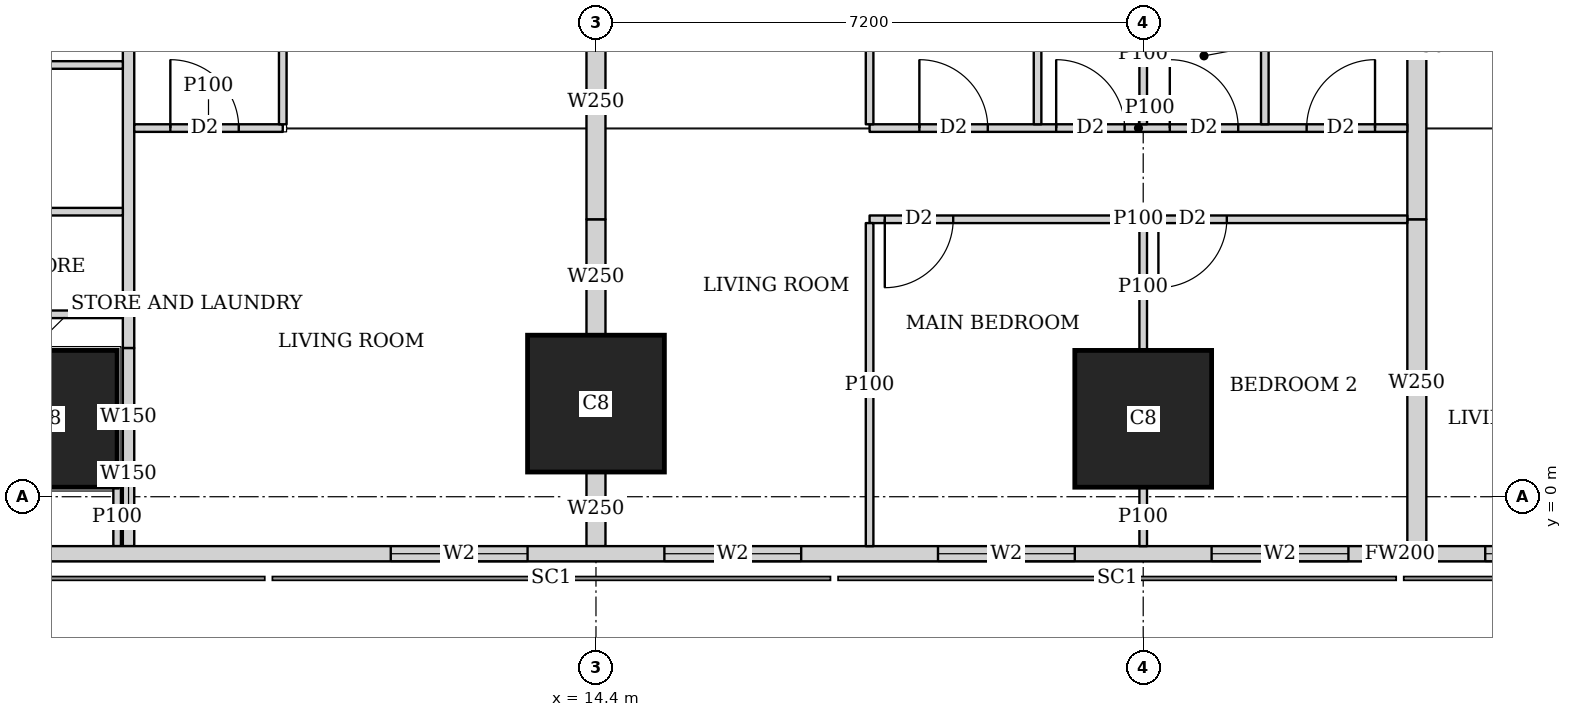
"""IFC4 building model, lengths in metres.
Left out: names, types, materials, properties, quantities, classifications, styles, units other than length and angle.
Written with IfcOpenShell. Run it as: python <this file> out.ifc"""

import sys

from ifc_helpers import new_model, si_unit, direction, frame, frame_2d, origin, origin_2d, place, context, subcontext, project, spatial, rectangle, extrude, element, fill, save


model = new_model("IFC4")
c1 = context("Model", 3, precision=1e-05, world=origin(), true_north=direction((0.0, 1.0)))
c2 = subcontext(c1, "Body", "Model", "MODEL_VIEW")
j1 = project(units=[si_unit("LENGTHUNIT", "METRE"), si_unit("PLANEANGLEUNIT", "RADIAN")], contexts=[c1])
p1 = place(None, origin())
s1 = spatial("IfcSite", under=j1, at=p1, CompositionType="ELEMENT")
p2 = place(p1, origin())
s2 = spatial("IfcBuilding", under=s1, at=p2, CompositionType="ELEMENT")
p3 = place(p2, frame((0.0, 0.0, 147.05)))
s3 = spatial("IfcBuildingStorey", under=s2, at=p3, CompositionType="ELEMENT", Elevation=147.05)
for number, where, z_axis, x_axis in (
    (1, (7.2, 1.025, 0.0), (0.0, 0.0, 1.0), (1.0, 0.0, 0.0)),
    (2, (14.4, 1.225, 0.0), (0.0, 0.0, 1.0), (1.0, 0.0, 0.0)),
    (3, (21.6, 1.025, 0.0), (0.0, 0.0, 1.0), (1.0, 0.0, 0.0)),
):
    element("IfcColumn", number, at=place(p3, frame(where, z_axis=z_axis, x_axis=x_axis)), inside=s3, PredefinedType="COLUMN", context=c2, shape_type="SweptSolid", body=[
        extrude(rectangle(XDim=1.8, YDim=1.8, at=origin_2d()), origin(), (0.0, 0.0, 1.0), 3.75),
    ])
p4 = place(p3, frame((2.163, -0.75, 0.0), z_axis=(0.0, 0.0, 1.0), x_axis=(1.0, 0.0, 0.0)))
e4 = element("IfcWall", 4, at=p4, inside=s3, PredefinedType="SOLIDWALL", context=c2, shape_type="SweptSolid", body=[
    extrude(rectangle(XDim=45.628, YDim=0.2, at=frame_2d((22.814, 0.0))), origin(), (0.0, 0.0, 1.0), 3.5),
])
p5 = place(p4, frame((9.537, 0.0, 0.9)))
e5 = element("IfcOpeningElement", 5, at=p5, cuts=e4, PredefinedType="OPENING", context=c2, shape_type="SweptSolid", body=[
    extrude(rectangle(XDim=1.8, YDim=1.5, at=frame_2d((0.9, 0.75))), frame((0.0, 0.11, 0.0), z_axis=(0.0, -1.0, 0.0), x_axis=(1.0, 0.0, 0.0)), (0.0, 0.0, 1.0), 0.22),
])
p6 = place(p4, frame((13.137, 0.0, 0.9)))
e6 = element("IfcOpeningElement", 6, at=p6, cuts=e4, PredefinedType="OPENING", context=c2, shape_type="SweptSolid", body=[
    extrude(rectangle(XDim=1.8, YDim=1.5, at=frame_2d((0.9, 0.75))), frame((0.0, 0.11, 0.0), z_axis=(0.0, -1.0, 0.0), x_axis=(1.0, 0.0, 0.0)), (0.0, 0.0, 1.0), 0.22),
])
p7 = place(p4, frame((16.737, 0.0, 0.9)))
e7 = element("IfcOpeningElement", 7, at=p7, cuts=e4, PredefinedType="OPENING", context=c2, shape_type="SweptSolid", body=[
    extrude(rectangle(XDim=1.8, YDim=1.5, at=frame_2d((0.9, 0.75))), frame((0.0, 0.11, 0.0), z_axis=(0.0, -1.0, 0.0), x_axis=(1.0, 0.0, 0.0)), (0.0, 0.0, 1.0), 0.22),
])
p8 = place(p4, frame((20.337, 0.0, 0.9)))
e8 = element("IfcOpeningElement", 8, at=p8, cuts=e4, PredefinedType="OPENING", context=c2, shape_type="SweptSolid", body=[
    extrude(rectangle(XDim=1.8, YDim=1.5, at=frame_2d((0.9, 0.75))), frame((0.0, 0.11, 0.0), z_axis=(0.0, -1.0, 0.0), x_axis=(1.0, 0.0, 0.0)), (0.0, 0.0, 1.0), 0.22),
])
p9 = place(p4, frame((23.937, 0.0, 0.9)))
e9 = element("IfcOpeningElement", 9, at=p9, cuts=e4, PredefinedType="OPENING", context=c2, shape_type="SweptSolid", body=[
    extrude(rectangle(XDim=1.8, YDim=1.5, at=frame_2d((0.9, 0.75))), frame((0.0, 0.11, 0.0), z_axis=(0.0, -1.0, 0.0), x_axis=(1.0, 0.0, 0.0)), (0.0, 0.0, 1.0), 0.22),
])
p10 = place(p4, frame((27.537, 0.0, 0.9)))
e10 = element("IfcOpeningElement", 10, at=p10, cuts=e4, PredefinedType="OPENING", context=c2, shape_type="SweptSolid", body=[
    extrude(rectangle(XDim=1.8, YDim=1.5, at=frame_2d((0.9, 0.75))), frame((0.0, 0.11, 0.0), z_axis=(0.0, -1.0, 0.0), x_axis=(1.0, 0.0, 0.0)), (0.0, 0.0, 1.0), 0.22),
])
p11 = place(p4, frame((31.137, 0.0, 0.9)))
e11 = element("IfcOpeningElement", 11, at=p11, cuts=e4, PredefinedType="OPENING", context=c2, shape_type="SweptSolid", body=[
    extrude(rectangle(XDim=1.8, YDim=1.5, at=frame_2d((0.9, 0.75))), frame((0.0, 0.11, 0.0), z_axis=(0.0, -1.0, 0.0), x_axis=(1.0, 0.0, 0.0)), (0.0, 0.0, 1.0), 0.22),
])
p12 = place(p4, frame((34.737, 0.0, 0.9)))
e12 = element("IfcOpeningElement", 12, at=p12, cuts=e4, PredefinedType="OPENING", context=c2, shape_type="SweptSolid", body=[
    extrude(rectangle(XDim=1.8, YDim=1.5, at=frame_2d((0.9, 0.75))), frame((0.0, 0.11, 0.0), z_axis=(0.0, -1.0, 0.0), x_axis=(1.0, 0.0, 0.0)), (0.0, 0.0, 1.0), 0.22),
])
p13 = place(p3, frame((8.25, -0.65, 0.0), z_axis=(0.0, 0.0, 1.0), x_axis=(0.0, 1.0, 0.0)))
e13 = element("IfcWall", 13, at=p13, inside=s3, PredefinedType="SOLIDWALL", context=c2, shape_type="SweptSolid", body=[
    extrude(rectangle(XDim=0.802, YDim=0.15, at=frame_2d((0.401, 0.0))), origin(), (0.0, 0.0, 1.0), 3.5),
])
p14 = place(p3, frame((8.25, 0.152, 0.0), z_axis=(0.0, 0.0, 1.0), x_axis=(0.0, 1.0, 0.0)))
e14 = element("IfcWall", 14, at=p14, inside=s3, PredefinedType="SOLIDWALL", context=c2, shape_type="SweptSolid", body=[
    extrude(rectangle(XDim=1.805, YDim=0.15, at=frame_2d((0.902, 0.0))), origin(), (0.0, 0.0, 1.0), 2.1),
])
p15 = place(p3, frame((8.25, 1.957, 0.0), z_axis=(0.0, 0.0, 1.0), x_axis=(0.0, 1.0, 0.0)))
e15 = element("IfcWall", 15, at=p15, inside=s3, PredefinedType="SOLIDWALL", context=c2, shape_type="SweptSolid", body=[
    extrude(rectangle(XDim=41.111, YDim=0.15, at=frame_2d((20.556, 0.0))), origin(), (0.0, 0.0, 1.0), 3.5),
])
p16 = place(p15, frame((14.418, 0.0, 0.0)))
e16 = element("IfcOpeningElement", 16, at=p16, cuts=e15, PredefinedType="OPENING", context=c2, shape_type="SweptSolid", body=[
    extrude(rectangle(XDim=1.0, YDim=2.1, at=frame_2d((0.5, 1.05))), frame((0.0, 0.085, 0.0), z_axis=(0.0, -1.0, 0.0), x_axis=(1.0, 0.0, 0.0)), (0.0, 0.0, 1.0), 0.17),
])
p17 = place(p15, frame((18.168, 0.0, 0.0)))
e17 = element("IfcOpeningElement", 17, at=p17, cuts=e15, PredefinedType="OPENING", context=c2, shape_type="SweptSolid", body=[
    extrude(rectangle(XDim=1.0, YDim=2.1, at=frame_2d((0.5, 1.05))), frame((0.0, 0.085, 0.0), z_axis=(0.0, -1.0, 0.0), x_axis=(1.0, 0.0, 0.0)), (0.0, 0.0, 1.0), 0.17),
])
p18 = place(p15, frame((33.168, 0.0, 0.0)))
e18 = element("IfcOpeningElement", 18, at=p18, cuts=e15, PredefinedType="OPENING", context=c2, shape_type="SweptSolid", body=[
    extrude(rectangle(XDim=1.0, YDim=2.1, at=frame_2d((0.5, 1.05))), frame((0.0, 0.085, 0.0), z_axis=(0.0, -1.0, 0.0), x_axis=(1.0, 0.0, 0.0)), (0.0, 0.0, 1.0), 0.17),
])
p19 = place(p3, frame((8.1, 0.124, 0.0), z_axis=(0.0, 0.0, 1.0), x_axis=(0.0, -1.0, 0.0)))
e19 = element("IfcWall", 19, at=p19, inside=s3, PredefinedType="PARTITIONING", context=c2, shape_type="SweptSolid", body=[
    extrude(rectangle(XDim=0.774, YDim=0.1, at=frame_2d((0.387, 0.0))), origin(), (0.0, 0.0, 1.0), 3.5),
])
for number, where, z_axis, x_axis in (
    (20, (4.9, 3.75, 0.0), (0.0, 0.0, 1.0), (1.0, 0.0, 0.0)),
    (21, (4.9, 5.68, 0.0), (0.0, 0.0, 1.0), (1.0, 0.0, 0.0)),
):
    element("IfcWall", number, at=place(p3, frame(where, z_axis=z_axis, x_axis=x_axis)), inside=s3, PredefinedType="PARTITIONING", context=c2, shape_type="SweptSolid", body=[
        extrude(rectangle(XDim=3.275, YDim=0.1, at=frame_2d((1.638, 0.0))), origin(), (0.0, 0.0, 1.0), 3.5),
    ])
p20 = place(p3, frame((10.279, 4.85, 0.0), z_axis=(0.0, 0.0, 1.0), x_axis=(-1.0, 0.0, 0.0)))
e22 = element("IfcWall", 22, at=p20, inside=s3, PredefinedType="PARTITIONING", context=c2, shape_type="SweptSolid", body=[
    extrude(rectangle(XDim=1.954, YDim=0.1, at=frame_2d((0.977, 0.0))), origin(), (0.0, 0.0, 1.0), 3.5),
])
p21 = place(p20, frame((0.579, 0.0, 0.0)))
e23 = element("IfcOpeningElement", 23, at=p21, cuts=e22, PredefinedType="OPENING", context=c2, shape_type="SweptSolid", body=[
    extrude(rectangle(XDim=0.9, YDim=2.1, at=frame_2d((0.45, 1.05))), frame((0.0, 0.06, 0.0), z_axis=(0.0, -1.0, 0.0), x_axis=(1.0, 0.0, 0.0)), (0.0, 0.0, 1.0), 0.12),
])
p22 = place(p3, frame((10.279, 4.9, 0.0), z_axis=(0.0, 0.0, 1.0), x_axis=(0.0, 1.0, 0.0)))
e24 = element("IfcWall", 24, at=p22, inside=s3, PredefinedType="PARTITIONING", context=c2, shape_type="SweptSolid", body=[
    extrude(rectangle(XDim=3.275, YDim=0.1, at=frame_2d((1.638, 0.0))), origin(), (0.0, 0.0, 1.0), 3.5),
])
p23 = place(p3, frame((25.075, 3.65, 0.0), z_axis=(0.0, 0.0, 1.0), x_axis=(-1.0, 0.0, 0.0)))
e25 = element("IfcWall", 25, at=p23, inside=s3, PredefinedType="PARTITIONING", context=c2, shape_type="SweptSolid", body=[
    extrude(rectangle(XDim=7.075, YDim=0.1, at=frame_2d((3.538, 0.0))), origin(), (0.0, 0.0, 1.0), 3.5),
])
p24 = place(p23, frame((5.975, 0.0, 0.0)))
e26 = element("IfcOpeningElement", 26, at=p24, cuts=e25, PredefinedType="OPENING", context=c2, shape_type="SweptSolid", body=[
    extrude(rectangle(XDim=0.9, YDim=2.1, at=frame_2d((0.45, 1.05))), frame((0.0, 0.06, 0.0), z_axis=(0.0, -1.0, 0.0), x_axis=(1.0, 0.0, 0.0)), (0.0, 0.0, 1.0), 0.12),
])
p25 = place(p23, frame((2.375, 0.0, 0.0)))
e27 = element("IfcOpeningElement", 27, at=p25, cuts=e25, PredefinedType="OPENING", context=c2, shape_type="SweptSolid", body=[
    extrude(rectangle(XDim=0.9, YDim=2.1, at=frame_2d((0.45, 1.05))), frame((0.0, 0.06, 0.0), z_axis=(0.0, -1.0, 0.0), x_axis=(1.0, 0.0, 0.0)), (0.0, 0.0, 1.0), 0.12),
])
p26 = place(p3, frame((25.075, 4.85, 0.0), z_axis=(0.0, 0.0, 1.0), x_axis=(-1.0, 0.0, 0.0)))
e28 = element("IfcWall", 28, at=p26, inside=s3, PredefinedType="PARTITIONING", context=c2, shape_type="SweptSolid", body=[
    extrude(rectangle(XDim=7.075, YDim=0.1, at=frame_2d((3.538, 0.0))), origin(), (0.0, 0.0, 1.0), 3.5),
])
p27 = place(p26, frame((5.52, 0.0, 0.0)))
e29 = element("IfcOpeningElement", 29, at=p27, cuts=e28, PredefinedType="OPENING", context=c2, shape_type="SweptSolid", body=[
    extrude(rectangle(XDim=0.9, YDim=2.1, at=frame_2d((0.45, 1.05))), frame((0.0, 0.06, 0.0), z_axis=(0.0, -1.0, 0.0), x_axis=(1.0, 0.0, 0.0)), (0.0, 0.0, 1.0), 0.12),
])
p28 = place(p26, frame((2.225, 0.0, 0.0)))
e30 = element("IfcOpeningElement", 30, at=p28, cuts=e28, PredefinedType="OPENING", context=c2, shape_type="SweptSolid", body=[
    extrude(rectangle(XDim=0.9, YDim=2.1, at=frame_2d((0.45, 1.05))), frame((0.0, 0.06, 0.0), z_axis=(0.0, -1.0, 0.0), x_axis=(1.0, 0.0, 0.0)), (0.0, 0.0, 1.0), 0.12),
])
p29 = place(p26, frame((3.72, 0.0, 0.0)))
e31 = element("IfcOpeningElement", 31, at=p29, cuts=e28, PredefinedType="OPENING", context=c2, shape_type="SweptSolid", body=[
    extrude(rectangle(XDim=0.9, YDim=2.1, at=frame_2d((0.45, 1.05))), frame((0.0, 0.06, 0.0), z_axis=(0.0, -1.0, 0.0), x_axis=(1.0, 0.0, 0.0)), (0.0, 0.0, 1.0), 0.12),
])
p30 = place(p26, frame((0.425, 0.0, 0.0)))
e32 = element("IfcOpeningElement", 32, at=p30, cuts=e28, PredefinedType="OPENING", context=c2, shape_type="SweptSolid", body=[
    extrude(rectangle(XDim=0.9, YDim=2.1, at=frame_2d((0.45, 1.05))), frame((0.0, 0.06, 0.0), z_axis=(0.0, -1.0, 0.0), x_axis=(1.0, 0.0, 0.0)), (0.0, 0.0, 1.0), 0.12),
])
p31 = place(p3, frame((18.0, -0.65, 0.0), z_axis=(0.0, 0.0, 1.0), x_axis=(0.0, 1.0, 0.0)))
e33 = element("IfcWall", 33, at=p31, inside=s3, PredefinedType="PARTITIONING", context=c2, shape_type="SweptSolid", body=[
    extrude(rectangle(XDim=4.25, YDim=0.1, at=frame_2d((2.125, 0.0))), origin(), (0.0, 0.0, 1.0), 2.1),
])
p32 = place(p3, frame((21.6, -0.65, 0.0), z_axis=(0.0, 0.0, 1.0), x_axis=(0.0, 1.0, 0.0)))
e34 = element("IfcWall", 34, at=p32, inside=s3, PredefinedType="PARTITIONING", context=c2, shape_type="SweptSolid", body=[
    extrude(rectangle(XDim=0.774, YDim=0.1, at=frame_2d((0.387, 0.0))), origin(), (0.0, 0.0, 1.0), 3.5),
])
p33 = place(p3, frame((21.6, 1.926, 0.0), z_axis=(0.0, 0.0, 1.0), x_axis=(0.0, 1.0, 0.0)))
e35 = element("IfcWall", 35, at=p33, inside=s3, PredefinedType="PARTITIONING", context=c2, shape_type="SweptSolid", body=[
    extrude(rectangle(XDim=1.674, YDim=0.1, at=frame_2d((0.837, 0.0))), origin(), (0.0, 0.0, 1.0), 3.5),
])
p34 = place(p3, frame((18.0, 4.9, 0.0), z_axis=(0.0, 0.0, 1.0), x_axis=(0.0, 1.0, 0.0)))
e36 = element("IfcWall", 36, at=p34, inside=s3, PredefinedType="PARTITIONING", context=c2, shape_type="SweptSolid", body=[
    extrude(rectangle(XDim=3.275, YDim=0.1, at=frame_2d((1.638, 0.0))), origin(), (0.0, 0.0, 1.0), 3.5),
])
p35 = place(p3, frame((21.6, 4.9, 0.0), z_axis=(0.0, 0.0, 1.0), x_axis=(0.0, 1.0, 0.0)))
e37 = element("IfcWall", 37, at=p35, inside=s3, PredefinedType="PARTITIONING", context=c2, shape_type="SweptSolid", body=[
    extrude(rectangle(XDim=1.849, YDim=0.1, at=frame_2d((0.925, 0.0))), origin(), (0.0, 0.0, 1.0), 3.5),
])
for number, where, z_axis, x_axis in (
    (38, (20.21, 4.9, 0.0), (0.0, 0.0, 1.0), (0.0, 1.0, 0.0)),
    (39, (23.2, 4.9, 0.0), (0.0, 0.0, 1.0), (0.0, 1.0, 0.0)),
):
    element("IfcWall", number, at=place(p3, frame(where, z_axis=z_axis, x_axis=x_axis)), inside=s3, PredefinedType="PARTITIONING", context=c2, shape_type="SweptSolid", body=[
        extrude(rectangle(XDim=3.275, YDim=0.1, at=frame_2d((1.638, 0.0))), origin(), (0.0, 0.0, 1.0), 3.5),
    ])
p36 = place(p3, frame((14.4, -0.65, 0.0), z_axis=(0.0, 0.0, 1.0), x_axis=(0.0, 1.0, 0.0)))
e40 = element("IfcWall", 40, at=p36, inside=s3, PredefinedType="SOLIDWALL", context=c2, shape_type="SweptSolid", body=[
    extrude(rectangle(XDim=0.974, YDim=0.25, at=frame_2d((0.487, 0.0))), origin(), (0.0, 0.0, 1.0), 2.1),
])
p37 = place(p3, frame((14.4, 2.126, 0.0), z_axis=(0.0, 0.0, 1.0), x_axis=(0.0, 1.0, 0.0)))
e41 = element("IfcWall", 41, at=p37, inside=s3, PredefinedType="SOLIDWALL", context=c2, shape_type="SweptSolid", body=[
    extrude(rectangle(XDim=1.524, YDim=0.25, at=frame_2d((0.762, 0.0))), origin(), (0.0, 0.0, 1.0), 2.1),
])
p38 = place(p3, frame((14.4, 3.65, 0.0), z_axis=(0.0, 0.0, 1.0), x_axis=(0.0, 1.0, 0.0)))
e42 = element("IfcWall", 42, at=p38, inside=s3, PredefinedType="SOLIDWALL", context=c2, shape_type="SweptSolid", body=[
    extrude(rectangle(XDim=3.099, YDim=0.25, at=frame_2d((1.55, 0.0))), origin(), (0.0, 0.0, 1.0), 3.5),
])
p39 = place(p3, frame((25.2, -0.65, 0.0), z_axis=(0.0, 0.0, 1.0), x_axis=(0.0, 1.0, 0.0)))
e43 = element("IfcWall", 43, at=p39, inside=s3, PredefinedType="SOLIDWALL", context=c2, shape_type="SweptSolid", body=[
    extrude(rectangle(XDim=4.3, YDim=0.25, at=frame_2d((2.15, 0.0))), origin(), (0.0, 0.0, 1.0), 2.1),
])
p40 = place(p3, frame((25.2, 3.65, 0.0), z_axis=(0.0, 0.0, 1.0), x_axis=(0.0, 1.0, 0.0)))
e44 = element("IfcWall", 44, at=p40, inside=s3, PredefinedType="SOLIDWALL", context=c2, shape_type="SweptSolid", body=[
    extrude(rectangle(XDim=4.525, YDim=0.25, at=frame_2d((2.263, 0.0))), origin(), (0.0, 0.0, 1.0), 3.5),
])
p41 = place(p3, frame((5.467, 2.4, 0.0), z_axis=(0.0, 0.0, 1.0), x_axis=(1.0, 0.0, 0.0)))
e45 = element("IfcWall", 45, at=p41, inside=s3, PredefinedType="PARTITIONING", context=c2, shape_type="SweptSolid", body=[
    extrude(rectangle(XDim=2.708, YDim=0.1, at=frame_2d((1.354, 0.0))), origin(), (0.0, 0.0, 1.0), 3.5),
])
p42 = place(p41, frame((0.108, 0.0, 0.0)))
e46 = element("IfcOpeningElement", 46, at=p42, cuts=e45, PredefinedType="OPENING", context=c2, shape_type="SweptSolid", body=[
    extrude(rectangle(XDim=0.9, YDim=2.1, at=frame_2d((0.45, 1.05))), frame((0.0, 0.06, 0.0), z_axis=(0.0, -1.0, 0.0), x_axis=(1.0, 0.0, 0.0)), (0.0, 0.0, 1.0), 0.12),
])
p43 = place(p5, origin())
e47 = element("IfcWindow", 47, at=p43, inside=s3, PartitioningType="SINGLE_PANEL", PredefinedType="WINDOW", context=c2, shape_type="SweptSolid", body=[
    extrude(rectangle(XDim=1.8, YDim=1.5, at=frame_2d((0.9, 0.75))), frame((0.0, 0.03, 0.0), z_axis=(0.0, -1.0, 0.0), x_axis=(1.0, 0.0, 0.0)), (0.0, 0.0, 1.0), 0.06),
])
fill(e5, e47)
p44 = place(p6, origin())
e48 = element("IfcWindow", 48, at=p44, inside=s3, PartitioningType="SINGLE_PANEL", PredefinedType="WINDOW", context=c2, shape_type="SweptSolid", body=[
    extrude(rectangle(XDim=1.8, YDim=1.5, at=frame_2d((0.9, 0.75))), frame((0.0, 0.03, 0.0), z_axis=(0.0, -1.0, 0.0), x_axis=(1.0, 0.0, 0.0)), (0.0, 0.0, 1.0), 0.06),
])
fill(e6, e48)
p45 = place(p7, origin())
e49 = element("IfcWindow", 49, at=p45, inside=s3, PartitioningType="SINGLE_PANEL", PredefinedType="WINDOW", context=c2, shape_type="SweptSolid", body=[
    extrude(rectangle(XDim=1.8, YDim=1.5, at=frame_2d((0.9, 0.75))), frame((0.0, 0.03, 0.0), z_axis=(0.0, -1.0, 0.0), x_axis=(1.0, 0.0, 0.0)), (0.0, 0.0, 1.0), 0.06),
])
fill(e7, e49)
p46 = place(p8, origin())
e50 = element("IfcWindow", 50, at=p46, inside=s3, PartitioningType="SINGLE_PANEL", PredefinedType="WINDOW", context=c2, shape_type="SweptSolid", body=[
    extrude(rectangle(XDim=1.8, YDim=1.5, at=frame_2d((0.9, 0.75))), frame((0.0, 0.03, 0.0), z_axis=(0.0, -1.0, 0.0), x_axis=(1.0, 0.0, 0.0)), (0.0, 0.0, 1.0), 0.06),
])
fill(e8, e50)
p47 = place(p9, origin())
e51 = element("IfcWindow", 51, at=p47, inside=s3, PartitioningType="SINGLE_PANEL", PredefinedType="WINDOW", context=c2, shape_type="SweptSolid", body=[
    extrude(rectangle(XDim=1.8, YDim=1.5, at=frame_2d((0.9, 0.75))), frame((0.0, 0.03, 0.0), z_axis=(0.0, -1.0, 0.0), x_axis=(1.0, 0.0, 0.0)), (0.0, 0.0, 1.0), 0.06),
])
fill(e9, e51)
p48 = place(p21, origin())
e52 = element("IfcDoor", 52, at=p48, inside=s3, OperationType="SINGLE_SWING_LEFT", PredefinedType="DOOR", context=c2, shape_type="SweptSolid", body=[
    extrude(rectangle(XDim=0.9, YDim=2.1, at=frame_2d((0.45, 1.05))), frame((0.0, 0.025, 0.0), z_axis=(0.0, -1.0, 0.0), x_axis=(1.0, 0.0, 0.0)), (0.0, 0.0, 1.0), 0.05),
])
fill(e23, e52)
p49 = place(p24, origin())
e53 = element("IfcDoor", 53, at=p49, inside=s3, OperationType="SINGLE_SWING_RIGHT", PredefinedType="DOOR", context=c2, shape_type="SweptSolid", body=[
    extrude(rectangle(XDim=0.9, YDim=2.1, at=frame_2d((0.45, 1.05))), frame((0.0, 0.025, 0.0), z_axis=(0.0, -1.0, 0.0), x_axis=(1.0, 0.0, 0.0)), (0.0, 0.0, 1.0), 0.05),
])
fill(e26, e53)
p50 = place(p25, origin())
e54 = element("IfcDoor", 54, at=p50, inside=s3, OperationType="SINGLE_SWING_RIGHT", PredefinedType="DOOR", context=c2, shape_type="SweptSolid", body=[
    extrude(rectangle(XDim=0.9, YDim=2.1, at=frame_2d((0.45, 1.05))), frame((0.0, 0.025, 0.0), z_axis=(0.0, -1.0, 0.0), x_axis=(1.0, 0.0, 0.0)), (0.0, 0.0, 1.0), 0.05),
])
fill(e27, e54)
p51 = place(p27, origin())
e55 = element("IfcDoor", 55, at=p51, inside=s3, OperationType="SINGLE_SWING_LEFT", PredefinedType="DOOR", context=c2, shape_type="SweptSolid", body=[
    extrude(rectangle(XDim=0.9, YDim=2.1, at=frame_2d((0.45, 1.05))), frame((0.0, 0.025, 0.0), z_axis=(0.0, -1.0, 0.0), x_axis=(1.0, 0.0, 0.0)), (0.0, 0.0, 1.0), 0.05),
])
fill(e29, e55)
p52 = place(p28, origin())
e56 = element("IfcDoor", 56, at=p52, inside=s3, OperationType="SINGLE_SWING_LEFT", PredefinedType="DOOR", context=c2, shape_type="SweptSolid", body=[
    extrude(rectangle(XDim=0.9, YDim=2.1, at=frame_2d((0.45, 1.05))), frame((0.0, 0.025, 0.0), z_axis=(0.0, -1.0, 0.0), x_axis=(1.0, 0.0, 0.0)), (0.0, 0.0, 1.0), 0.05),
])
fill(e30, e56)
p53 = place(p29, origin())
e57 = element("IfcDoor", 57, at=p53, inside=s3, OperationType="SINGLE_SWING_LEFT", PredefinedType="DOOR", context=c2, shape_type="SweptSolid", body=[
    extrude(rectangle(XDim=0.9, YDim=2.1, at=frame_2d((0.45, 1.05))), frame((0.0, 0.025, 0.0), z_axis=(0.0, -1.0, 0.0), x_axis=(1.0, 0.0, 0.0)), (0.0, 0.0, 1.0), 0.05),
])
fill(e31, e57)
p54 = place(p30, origin())
e58 = element("IfcDoor", 58, at=p54, inside=s3, OperationType="SINGLE_SWING_RIGHT", PredefinedType="DOOR", context=c2, shape_type="SweptSolid", body=[
    extrude(rectangle(XDim=0.9, YDim=2.1, at=frame_2d((0.45, 1.05))), frame((0.0, 0.025, 0.0), z_axis=(0.0, -1.0, 0.0), x_axis=(1.0, 0.0, 0.0)), (0.0, 0.0, 1.0), 0.05),
])
fill(e32, e58)
save(model, sys.argv[1])
